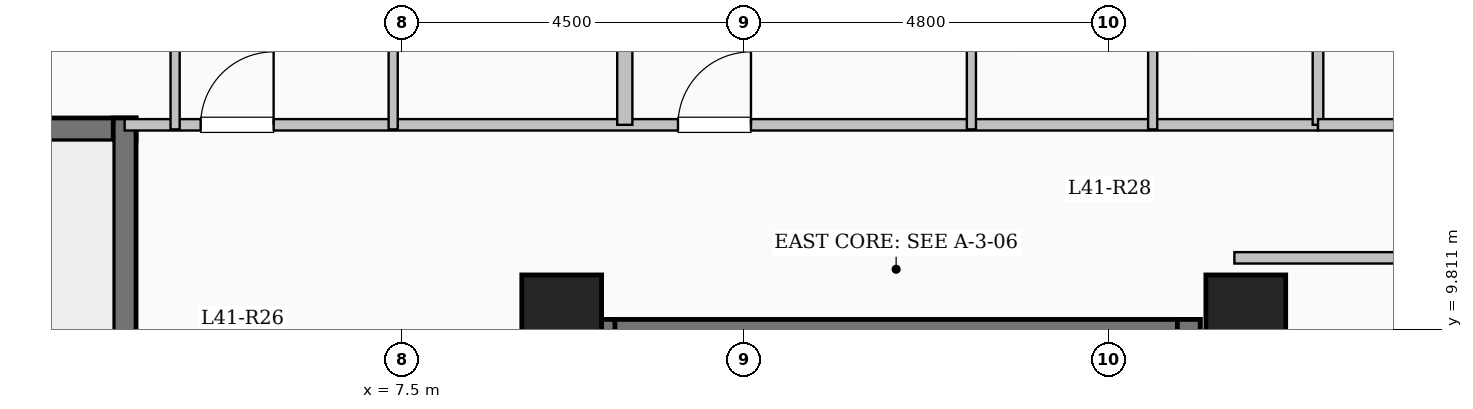
"""IFC4 building model, lengths in metres.
Left out: names, types, materials, properties, quantities, classifications, styles, units other than length and angle.
Written with IfcOpenShell. Run it as: python <this file> out.ifc"""

import sys

from ifc_helpers import new_model, si_unit, direction, frame, frame_2d, origin, origin_2d, place, context, subcontext, project, spatial, rectangle, extrude, element, fill, save


model = new_model("IFC4")
c1 = context("Model", 3, precision=1e-05, world=origin(), true_north=direction((0.0, 1.0)))
c2 = subcontext(c1, "Body", "Model", "MODEL_VIEW")
j1 = project(units=[si_unit("LENGTHUNIT", "METRE"), si_unit("PLANEANGLEUNIT", "RADIAN")], contexts=[c1])
p1 = place(None, origin())
s1 = spatial("IfcSite", under=j1, at=p1, CompositionType="ELEMENT")
p2 = place(p1, origin())
s2 = spatial("IfcBuilding", under=s1, at=p2, CompositionType="ELEMENT")
p3 = place(p2, frame((0.0, 0.0, 152.7)))
s3 = spatial("IfcBuildingStorey", under=s2, at=p3, CompositionType="ELEMENT", Elevation=152.7)
for number, where, z_axis, x_axis in (
    (1, (9.6, 10.0, 0.0), (0.0, 0.0, 1.0), (1.0, 0.0, 0.0)),
    (2, (18.6, 10.0, 0.0), (0.0, 0.0, 1.0), (1.0, 0.0, 0.0)),
):
    element("IfcColumn", number, at=place(p3, frame(where, z_axis=z_axis, x_axis=x_axis)), inside=s3, PredefinedType="COLUMN", context=c2, shape_type="SweptSolid", body=[
        extrude(rectangle(XDim=1.05, YDim=1.05, at=origin_2d()), origin(), (0.0, 0.0, 1.0), 3.35),
    ])
p4 = place(p3, frame((10.0, 9.79, 0.0), z_axis=(0.0, 0.0, 1.0), x_axis=(1.0, 0.0, 0.0)))
e3 = element("IfcWall", 3, at=p4, inside=s3, PredefinedType="SHEAR", context=c2, shape_type="SweptSolid", body=[
    extrude(rectangle(XDim=8.0, YDim=0.3, at=frame_2d((4.0, 0.0))), origin(), (0.0, 0.0, 1.0), 3.35),
])
for number, where, z_axis, x_axis in (
    (4, (10.15, 6.35, 0.0), (0.0, 0.0, 1.0), (0.0, 1.0, 0.0)),
    (5, (17.85, 6.35, 0.0), (0.0, 0.0, 1.0), (0.0, 1.0, 0.0)),
):
    element("IfcWall", number, at=place(p3, frame(where, z_axis=z_axis, x_axis=x_axis)), inside=s3, PredefinedType="SHEAR", context=c2, shape_type="SweptSolid", body=[
        extrude(rectangle(XDim=3.59, YDim=0.3, at=frame_2d((1.795, 0.0))), origin(), (0.0, 0.0, 1.0), 3.35),
    ])
p5 = place(p3, frame((-4.0, 12.44, 0.0), z_axis=(0.0, 0.0, 1.0), x_axis=(1.0, 0.0, 0.0)))
e6 = element("IfcWall", 6, at=p5, inside=s3, PredefinedType="SHEAR", context=c2, shape_type="SweptSolid", body=[
    extrude(rectangle(XDim=8.0, YDim=0.3, at=frame_2d((4.0, 0.0))), origin(), (0.0, 0.0, 1.0), 3.35),
])
p6 = place(p3, frame((3.85, 9.0, 0.0), z_axis=(0.0, 0.0, 1.0), x_axis=(0.0, 1.0, 0.0)))
e7 = element("IfcWall", 7, at=p6, inside=s3, PredefinedType="SHEAR", context=c2, shape_type="SweptSolid", body=[
    extrude(rectangle(XDim=3.59, YDim=0.3, at=frame_2d((1.795, 0.0))), origin(), (0.0, 0.0, 1.0), 3.35),
])
p7 = place(p3, frame((3.85, 12.5, 0.0), z_axis=(0.0, 0.0, 1.0), x_axis=(1.0, 0.0, 0.0)))
e8 = element("IfcWall", 8, at=p7, inside=s3, PredefinedType="PARTITIONING", context=c2, shape_type="SweptSolid", body=[
    extrude(rectangle(XDim=15.7, YDim=0.15, at=frame_2d((7.85, 0.0))), origin(), (0.0, 0.0, 1.0), 3.1),
])
p8 = place(p7, frame((1.0, 0.0, 0.0)))
e9 = element("IfcOpeningElement", 9, at=p8, cuts=e8, PredefinedType="OPENING", context=c2, shape_type="SweptSolid", body=[
    extrude(rectangle(XDim=0.96, YDim=2.15, at=frame_2d((0.48, 1.075))), frame((0.0, 0.085, 0.0), z_axis=(0.0, -1.0, 0.0), x_axis=(1.0, 0.0, 0.0)), (0.0, 0.0, 1.0), 0.17),
])
p9 = place(p7, frame((7.28, 0.0, 0.0)))
e10 = element("IfcOpeningElement", 10, at=p9, cuts=e8, PredefinedType="OPENING", context=c2, shape_type="SweptSolid", body=[
    extrude(rectangle(XDim=0.96, YDim=2.15, at=frame_2d((0.48, 1.075))), frame((0.0, 0.085, 0.0), z_axis=(0.0, -1.0, 0.0), x_axis=(1.0, 0.0, 0.0)), (0.0, 0.0, 1.0), 0.17),
])
p10 = place(p3, frame((10.43, 12.5, 0.0), z_axis=(0.0, 0.0, 1.0), x_axis=(0.0, 1.0, 0.0)))
e11 = element("IfcWall", 11, at=p10, inside=s3, PredefinedType="SOLIDWALL", context=c2, shape_type="SweptSolid", body=[
    extrude(rectangle(XDim=8.841, YDim=0.2, at=frame_2d((4.42, 0.0))), origin(), (0.0, 0.0, 1.0), 3.1),
])
p11 = place(p3, frame((4.514, 12.44, 0.0), z_axis=(0.0, 0.0, 1.0), x_axis=(0.0, 1.0, 0.0)))
e12 = element("IfcWall", 12, at=p11, inside=s3, PredefinedType="PARTITIONING", context=c2, shape_type="SweptSolid", body=[
    extrude(rectangle(XDim=10.24, YDim=0.12, at=frame_2d((5.12, 0.0))), origin(), (0.0, 0.0, 1.0), 3.1),
])
p12 = place(p11, frame((3.245, 0.0, 0.0)))
e13 = element("IfcOpeningElement", 13, at=p12, cuts=e12, PredefinedType="OPENING", context=c2, shape_type="SweptSolid", body=[
    extrude(rectangle(XDim=1.08, YDim=2.15, at=frame_2d((0.54, 1.075))), frame((0.0, 0.07, 0.0), z_axis=(0.0, -1.0, 0.0), x_axis=(1.0, 0.0, 0.0)), (0.0, 0.0, 1.0), 0.14),
])
p13 = place(p3, frame((7.383, 12.44, 0.0), z_axis=(0.0, 0.0, 1.0), x_axis=(0.0, 1.0, 0.0)))
e14 = element("IfcWall", 14, at=p13, inside=s3, PredefinedType="PARTITIONING", context=c2, shape_type="SweptSolid", body=[
    extrude(rectangle(XDim=2.96, YDim=0.12, at=frame_2d((1.48, 0.0))), origin(), (0.0, 0.0, 1.0), 2.585),
])
p14 = place(p3, frame((14.99, 12.44, 0.0), z_axis=(0.0, 0.0, 1.0), x_axis=(0.0, 1.0, 0.0)))
e15 = element("IfcWall", 15, at=p14, inside=s3, PredefinedType="PARTITIONING", context=c2, shape_type="SweptSolid", body=[
    extrude(rectangle(XDim=8.76, YDim=0.12, at=frame_2d((4.38, 0.0))), origin(), (0.0, 0.0, 1.0), 2.585),
])
p15 = place(p14, frame((2.735, 0.0, 0.0)))
e16 = element("IfcOpeningElement", 16, at=p15, cuts=e15, PredefinedType="OPENING", context=c2, shape_type="SweptSolid", body=[
    extrude(rectangle(XDim=1.08, YDim=2.15, at=frame_2d((0.54, 1.075))), frame((0.0, 0.07, 0.0), z_axis=(0.0, -1.0, 0.0), x_axis=(1.0, 0.0, 0.0)), (0.0, 0.0, 1.0), 0.14),
])
p16 = place(p3, frame((17.375, 12.44, 0.0), z_axis=(0.0, 0.0, 1.0), x_axis=(0.0, 1.0, 0.0)))
e17 = element("IfcWall", 17, at=p16, inside=s3, PredefinedType="PARTITIONING", context=c2, shape_type="SweptSolid", body=[
    extrude(rectangle(XDim=2.45, YDim=0.12, at=frame_2d((1.225, 0.0))), origin(), (0.0, 0.0, 1.0), 3.1),
])
p17 = place(p3, frame((18.45, 10.75, 0.0), z_axis=(0.0, 0.0, 1.0), x_axis=(1.0, 0.0, 0.0)))
e18 = element("IfcWall", 18, at=p17, inside=s3, PredefinedType="PARTITIONING", context=c2, shape_type="SweptSolid", body=[
    extrude(rectangle(XDim=6.63, YDim=0.15, at=frame_2d((3.315, 0.0))), origin(), (0.0, 0.0, 1.0), 3.1),
])
p18 = place(p3, frame((19.55, 12.5, 0.0), z_axis=(0.0, 0.0, 1.0), x_axis=(0.0, 1.0, 0.0)))
e19 = element("IfcWall", 19, at=p18, inside=s3, PredefinedType="PARTITIONING", context=c2, shape_type="SweptSolid", body=[
    extrude(rectangle(XDim=4.75, YDim=0.14, at=frame_2d((2.375, 0.0))), origin(), (0.0, 0.0, 1.0), 3.1),
])
p19 = place(p3, frame((19.55, 12.5, 0.0), z_axis=(0.0, 0.0, 1.0), x_axis=(1.0, 0.0, 0.0)))
e20 = element("IfcWall", 20, at=p19, inside=s3, PredefinedType="PARTITIONING", context=c2, shape_type="SweptSolid", body=[
    extrude(rectangle(XDim=5.53, YDim=0.15, at=frame_2d((2.765, 0.0))), origin(), (0.0, 0.0, 1.0), 3.1),
])
p20 = place(p19, frame((2.29, 0.0, 0.0)))
e21 = element("IfcOpeningElement", 21, at=p20, cuts=e20, PredefinedType="OPENING", context=c2, shape_type="SweptSolid", body=[
    extrude(rectangle(XDim=0.95, YDim=2.15, at=frame_2d((0.475, 1.075))), frame((0.0, 0.085, 0.0), z_axis=(0.0, -1.0, 0.0), x_axis=(1.0, 0.0, 0.0)), (0.0, 0.0, 1.0), 0.17),
])
p21 = place(p8, origin())
e22 = element("IfcDoor", 22, at=p21, inside=s3, OperationType="SINGLE_SWING_RIGHT", PredefinedType="DOOR", context=c2, shape_type="SweptSolid", body=[
    extrude(rectangle(XDim=0.96, YDim=2.15, at=frame_2d((0.48, 1.075))), frame((0.0, 0.025, 0.0), z_axis=(0.0, -1.0, 0.0), x_axis=(1.0, 0.0, 0.0)), (0.0, 0.0, 1.0), 0.05),
])
fill(e9, e22)
p22 = place(p9, origin())
e23 = element("IfcDoor", 23, at=p22, inside=s3, OperationType="SINGLE_SWING_RIGHT", PredefinedType="DOOR", context=c2, shape_type="SweptSolid", body=[
    extrude(rectangle(XDim=0.96, YDim=2.15, at=frame_2d((0.48, 1.075))), frame((0.0, 0.025, 0.0), z_axis=(0.0, -1.0, 0.0), x_axis=(1.0, 0.0, 0.0)), (0.0, 0.0, 1.0), 0.05),
])
fill(e10, e23)
save(model, sys.argv[1])
